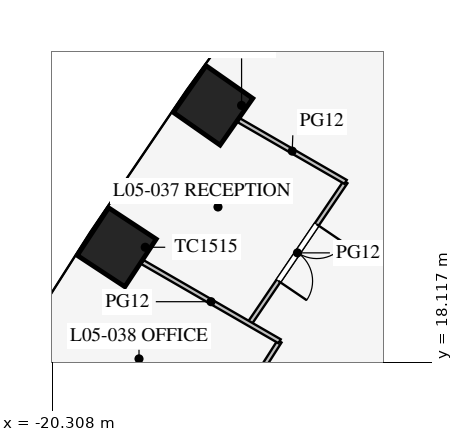
"""IFC4 building model, lengths in metres.
Left out: names, types, materials, properties, quantities, classifications, styles, units other than length and angle.
Written with IfcOpenShell. Run it as: python <this file> out.ifc"""

import sys

from ifc_helpers import new_model, si_unit, direction, frame, frame_2d, origin, origin_2d, place, context, subcontext, project, spatial, rectangle, extrude, element, fill, save


model = new_model("IFC4")
c1 = context("Model", 3, precision=1e-05, world=origin(), true_north=direction((0.0, 1.0)))
c2 = subcontext(c1, "Body", "Model", "MODEL_VIEW")
j1 = project(units=[si_unit("LENGTHUNIT", "METRE"), si_unit("PLANEANGLEUNIT", "RADIAN")], contexts=[c1])
p1 = place(None, origin())
s1 = spatial("IfcSite", under=j1, at=p1, CompositionType="ELEMENT")
p2 = place(p1, origin())
s2 = spatial("IfcBuilding", under=s1, at=p2, CompositionType="ELEMENT")
p3 = place(p2, frame((0.0, 0.0, 24.9)))
s3 = spatial("IfcBuildingStorey", under=s2, at=p3, CompositionType="ELEMENT", Elevation=24.9)
for number, where, z_axis, x_axis in (
    (1, (-16.076, 24.87, 0.0), (0.0, 0.0, 1.0), (-0.574, -0.819, 0.0)),
    (2, (-18.611, 21.137, 0.0), (0.0, 0.0, 1.0), (-0.549, -0.836, 0.0)),
    (3, (-21.031, 17.339, 0.0), (0.0, 0.0, 1.0), (-0.525, -0.851, 0.0)),
):
    element("IfcColumn", number, at=place(p3, frame(where, z_axis=z_axis, x_axis=x_axis)), inside=s3, PredefinedType="COLUMN", context=c2, shape_type="SweptSolid", body=[
        extrude(rectangle(XDim=1.5, YDim=1.5, at=origin_2d()), origin(), (0.0, 0.0, 1.0), 4.2),
    ])
p4 = place(p3, frame((-0.016, 30.491, 0.0), z_axis=(0.0, 0.0, 1.0), x_axis=(-0.50000091641, -0.866024874695, 0.0)))
e4 = element("IfcWall", 4, at=p4, inside=s3, PredefinedType="PARTITIONING", context=c2, shape_type="SweptSolid", body=[
    extrude(rectangle(XDim=52.796, YDim=0.12, at=frame_2d((26.398, 0.0))), origin(), (0.0, 0.0, 1.0), 2.9),
])
p5 = place(p4, frame((10.2, 0.0, 0.15)))
e5 = element("IfcOpeningElement", 5, at=p5, cuts=e4, PredefinedType="OPENING", context=c2, shape_type="SweptSolid", body=[
    extrude(rectangle(XDim=1.8, YDim=2.1, at=frame_2d((0.9, 1.05))), frame((0.0, 0.07, 0.0), z_axis=(0.0, -1.0, 0.0), x_axis=(1.0, 0.0, 0.0)), (0.0, 0.0, 1.0), 0.14),
])
p6 = place(p4, frame((40.8, 0.0, 0.15)))
e6 = element("IfcOpeningElement", 6, at=p6, cuts=e4, PredefinedType="OPENING", context=c2, shape_type="SweptSolid", body=[
    extrude(rectangle(XDim=1.8, YDim=2.1, at=frame_2d((0.9, 1.05))), frame((0.0, 0.07, 0.0), z_axis=(0.0, -1.0, 0.0), x_axis=(1.0, 0.0, 0.0)), (0.0, 0.0, 1.0), 0.14),
])
p7 = place(p3, frame((-12.588, 22.856, 0.0), z_axis=(0.0, 0.0, 1.0), x_axis=(-0.561486863223, -0.827485650889, 0.0)))
e7 = element("IfcWall", 7, at=p7, inside=s3, PredefinedType="PARTITIONING", context=c2, shape_type="SweptSolid", body=[
    extrude(rectangle(XDim=4.512, YDim=0.12, at=frame_2d((2.256, 0.0))), origin(), (0.0, 0.0, 1.0), 2.9),
])
p8 = place(p7, frame((1.35, 0.0, 0.15)))
e8 = element("IfcOpeningElement", 8, at=p8, cuts=e7, PredefinedType="OPENING", context=c2, shape_type="SweptSolid", body=[
    extrude(rectangle(XDim=1.8, YDim=2.1, at=frame_2d((0.9, 1.05))), frame((0.0, 0.07, 0.0), z_axis=(0.0, -1.0, 0.0), x_axis=(1.0, 0.0, 0.0)), (0.0, 0.0, 1.0), 0.14),
])
p9 = place(p3, frame((-14.325, 18.663, 0.0), z_axis=(0.0, 0.0, 1.0), x_axis=(-0.537205132487, -0.843451626135, 0.0)))
e9 = element("IfcWall", 9, at=p9, inside=s3, PredefinedType="PARTITIONING", context=c2, shape_type="SweptSolid", body=[
    extrude(rectangle(XDim=4.504, YDim=0.12, at=frame_2d((2.252, 0.0))), origin(), (0.0, 0.0, 1.0), 2.9),
])
p10 = place(p9, frame((1.8, 0.0, 0.15)))
e10 = element("IfcOpeningElement", 10, at=p10, cuts=e9, PredefinedType="OPENING", context=c2, shape_type="SweptSolid", body=[
    extrude(rectangle(XDim=0.9, YDim=2.1, at=frame_2d((0.45, 1.05))), frame((0.0, 0.07, 0.0), z_axis=(0.0, -1.0, 0.0), x_axis=(1.0, 0.0, 0.0)), (0.0, 0.0, 1.0), 0.14),
])
p11 = place(p3, frame((-12.588, 22.856, 0.0), z_axis=(0.0, 0.0, 1.0), x_axis=(-0.866043964491, 0.499967850536, 0.0)))
e11 = element("IfcWall", 11, at=p11, inside=s3, PredefinedType="PARTITIONING", context=c2, shape_type="SweptSolid", body=[
    extrude(rectangle(XDim=3.244, YDim=0.12, at=frame_2d((1.622, 0.0))), origin(), (0.0, 0.0, 1.0), 2.9),
])
p12 = place(p3, frame((-14.325, 18.663, 0.0), z_axis=(0.0, 0.0, 1.0), x_axis=(-0.866009971343, 0.50002672882, 0.0)))
e12 = element("IfcWall", 12, at=p12, inside=s3, PredefinedType="PARTITIONING", context=c2, shape_type="SweptSolid", body=[
    extrude(rectangle(XDim=4.167, YDim=0.12, at=frame_2d((2.083, 0.0))), origin(), (0.0, 0.0, 1.0), 2.9),
])
p13 = place(p8, origin())
e13 = element("IfcDoor", 13, at=p13, inside=s3, OperationType="DOUBLE_DOOR_SINGLE_SWING", PredefinedType="DOOR", context=c2, shape_type="SweptSolid", body=[
    extrude(rectangle(XDim=1.8, YDim=2.1, at=frame_2d((0.9, 1.05))), frame((0.0, 0.025, 0.0), z_axis=(0.0, -1.0, 0.0), x_axis=(1.0, 0.0, 0.0)), (0.0, 0.0, 1.0), 0.05),
])
fill(e8, e13)
save(model, sys.argv[1])
